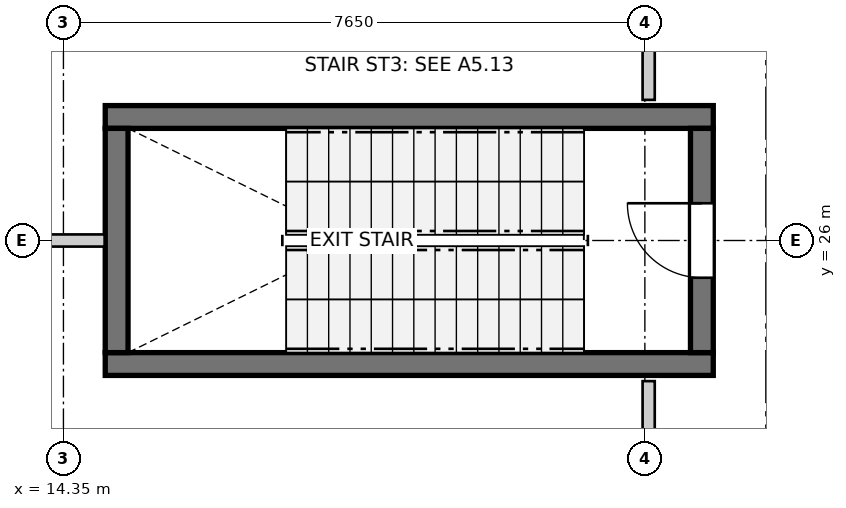
"""IFC4 building model, lengths in metres.
Left out: names, types, materials, properties, quantities, classifications, styles, units other than length and angle.
Written with IfcOpenShell. Run it as: python <this file> out.ifc"""

import sys

from ifc_helpers import new_model, si_unit, direction, frame, frame_2d, origin, place, context, subcontext, project, spatial, rectangle, extrude, source, transform, mapped, element, fill, save


model = new_model("IFC4")
c1 = context("Model", 3, precision=1e-05, world=origin(), true_north=direction((0.0, 1.0)))
c2 = subcontext(c1, "Body", "Model", "MODEL_VIEW")
j1 = project(units=[si_unit("LENGTHUNIT", "METRE"), si_unit("PLANEANGLEUNIT", "RADIAN")], contexts=[c1])
p1 = place(None, origin())
s1 = spatial("IfcSite", under=j1, at=p1, CompositionType="ELEMENT")
p2 = place(p1, origin())
s2 = spatial("IfcBuilding", under=s1, at=p2, CompositionType="ELEMENT")
p3 = place(p2, frame((0.0, 0.0, 128.0)))
s3 = spatial("IfcBuildingStorey", under=s2, at=p3, CompositionType="ELEMENT", Elevation=128.0)
for number, where, z_axis, x_axis in (
    (1, (14.9, 24.375, 0.0), (0.0, 0.0, 1.0), (1.0, 0.0, 0.0)),
    (2, (22.9, 27.625, 0.0), (0.0, 0.0, 1.0), (-1.0, 0.0, 0.0)),
):
    element("IfcWall", number, at=place(p3, frame(where, z_axis=z_axis, x_axis=x_axis)), inside=s3, PredefinedType="SHEAR", context=c2, shape_type="SweptSolid", body=[
        extrude(rectangle(XDim=8.0, YDim=0.3, at=frame_2d((4.0, 0.0))), origin(), (0.0, 0.0, 1.0), 4.75),
    ])
p4 = place(p3, frame((15.05, 27.475, 0.0), z_axis=(0.0, 0.0, 1.0), x_axis=(0.0, -1.0, 0.0)))
e3 = element("IfcWall", 3, at=p4, inside=s3, PredefinedType="SHEAR", context=c2, shape_type="SweptSolid", body=[
    extrude(rectangle(XDim=2.95, YDim=0.3, at=frame_2d((1.475, 0.0))), origin(), (0.0, 0.0, 1.0), 4.75),
])
p5 = place(p3, frame((22.75, 24.525, 0.0), z_axis=(0.0, 0.0, 1.0), x_axis=(0.0, 1.0, 0.0)))
e4 = element("IfcWall", 4, at=p5, inside=s3, PredefinedType="SHEAR", context=c2, shape_type="SweptSolid", body=[
    extrude(rectangle(XDim=2.95, YDim=0.3, at=frame_2d((1.475, 0.0))), origin(), (0.0, 0.0, 1.0), 4.75),
])
p6 = place(p5, frame((0.985, 0.0, 0.0)))
e5 = element("IfcOpeningElement", 5, at=p6, cuts=e4, PredefinedType="OPENING", context=c2, shape_type="SweptSolid", body=[
    extrude(rectangle(XDim=0.98, YDim=2.15, at=frame_2d((0.49, 1.075))), frame((0.0, 0.16, 0.0), z_axis=(0.0, -1.0, 0.0), x_axis=(1.0, 0.0, 0.0)), (0.0, 0.0, 1.0), 0.32),
])
p7 = place(p3, frame((22.05, 15.45, 0.0), z_axis=(0.0, 0.0, 1.0), x_axis=(0.0, 1.0, 0.0)))
e6 = element("IfcWall", 6, at=p7, inside=s3, PredefinedType="PARTITIONING", context=c2, shape_type="SweptSolid", body=[
    extrude(rectangle(XDim=8.7, YDim=0.16, at=frame_2d((4.35, 0.0))), origin(), (0.0, 0.0, 1.0), 4.75),
])
p8 = place(p7, frame((3.688, 0.0, 0.0)))
e7 = element("IfcOpeningElement", 7, at=p8, cuts=e6, PredefinedType="OPENING", context=c2, shape_type="SweptSolid", body=[
    extrude(rectangle(XDim=1.4, YDim=2.15, at=frame_2d((0.7, 1.075))), frame((0.0, 0.09, 0.0), z_axis=(0.0, -1.0, 0.0), x_axis=(1.0, 0.0, 0.0)), (0.0, 0.0, 1.0), 0.18),
])
p9 = place(p3, frame((22.05, 27.85, 0.0), z_axis=(0.0, 0.0, 1.0), x_axis=(0.0, 1.0, 0.0)))
e8 = element("IfcWall", 8, at=p9, inside=s3, PredefinedType="PARTITIONING", context=c2, shape_type="SweptSolid", body=[
    extrude(rectangle(XDim=8.7, YDim=0.16, at=frame_2d((4.35, 0.0))), origin(), (0.0, 0.0, 1.0), 4.75),
])
p10 = place(p9, frame((3.679, 0.0, 0.0)))
e9 = element("IfcOpeningElement", 9, at=p10, cuts=e8, PredefinedType="OPENING", context=c2, shape_type="SweptSolid", body=[
    extrude(rectangle(XDim=1.4, YDim=2.15, at=frame_2d((0.7, 1.075))), frame((0.0, 0.09, 0.0), z_axis=(0.0, -1.0, 0.0), x_axis=(1.0, 0.0, 0.0)), (0.0, 0.0, 1.0), 0.18),
])
p11 = place(p3, frame((6.04, 26.0, 0.0), z_axis=(0.0, 0.0, 1.0), x_axis=(1.0, 0.0, 0.0)))
e10 = element("IfcWall", 10, at=p11, inside=s3, PredefinedType="PARTITIONING", context=c2, shape_type="SweptSolid", body=[
    extrude(rectangle(XDim=8.852, YDim=0.16, at=frame_2d((4.426, 0.0))), origin(), (0.0, 0.0, 1.0), 4.75),
])
m1 = source(origin(), c2, "Body", "SweptSolid", [
    extrude(rectangle(XDim=0.98, YDim=2.15, at=frame_2d((0.49, 1.075))), frame((0.0, 0.025, 0.0), z_axis=(0.0, -1.0, 0.0), x_axis=(1.0, 0.0, 0.0)), (0.0, 0.0, 1.0), 0.05),
])
p12 = place(p6, origin())
e11 = element("IfcDoor", 11, at=p12, inside=s3, OperationType="SINGLE_SWING_RIGHT", PredefinedType="DOOR", context=c2, shape_type="MappedRepresentation", body=[
    mapped(m1, transform((0.0, 0.0, 0.0), x_axis=(1.0, 0.0, 0.0), y_axis=(0.0, 1.0, 0.0), z_axis=(0.0, 0.0, 1.0), scale=1.0)),
])
fill(e5, e11)
save(model, sys.argv[1])
